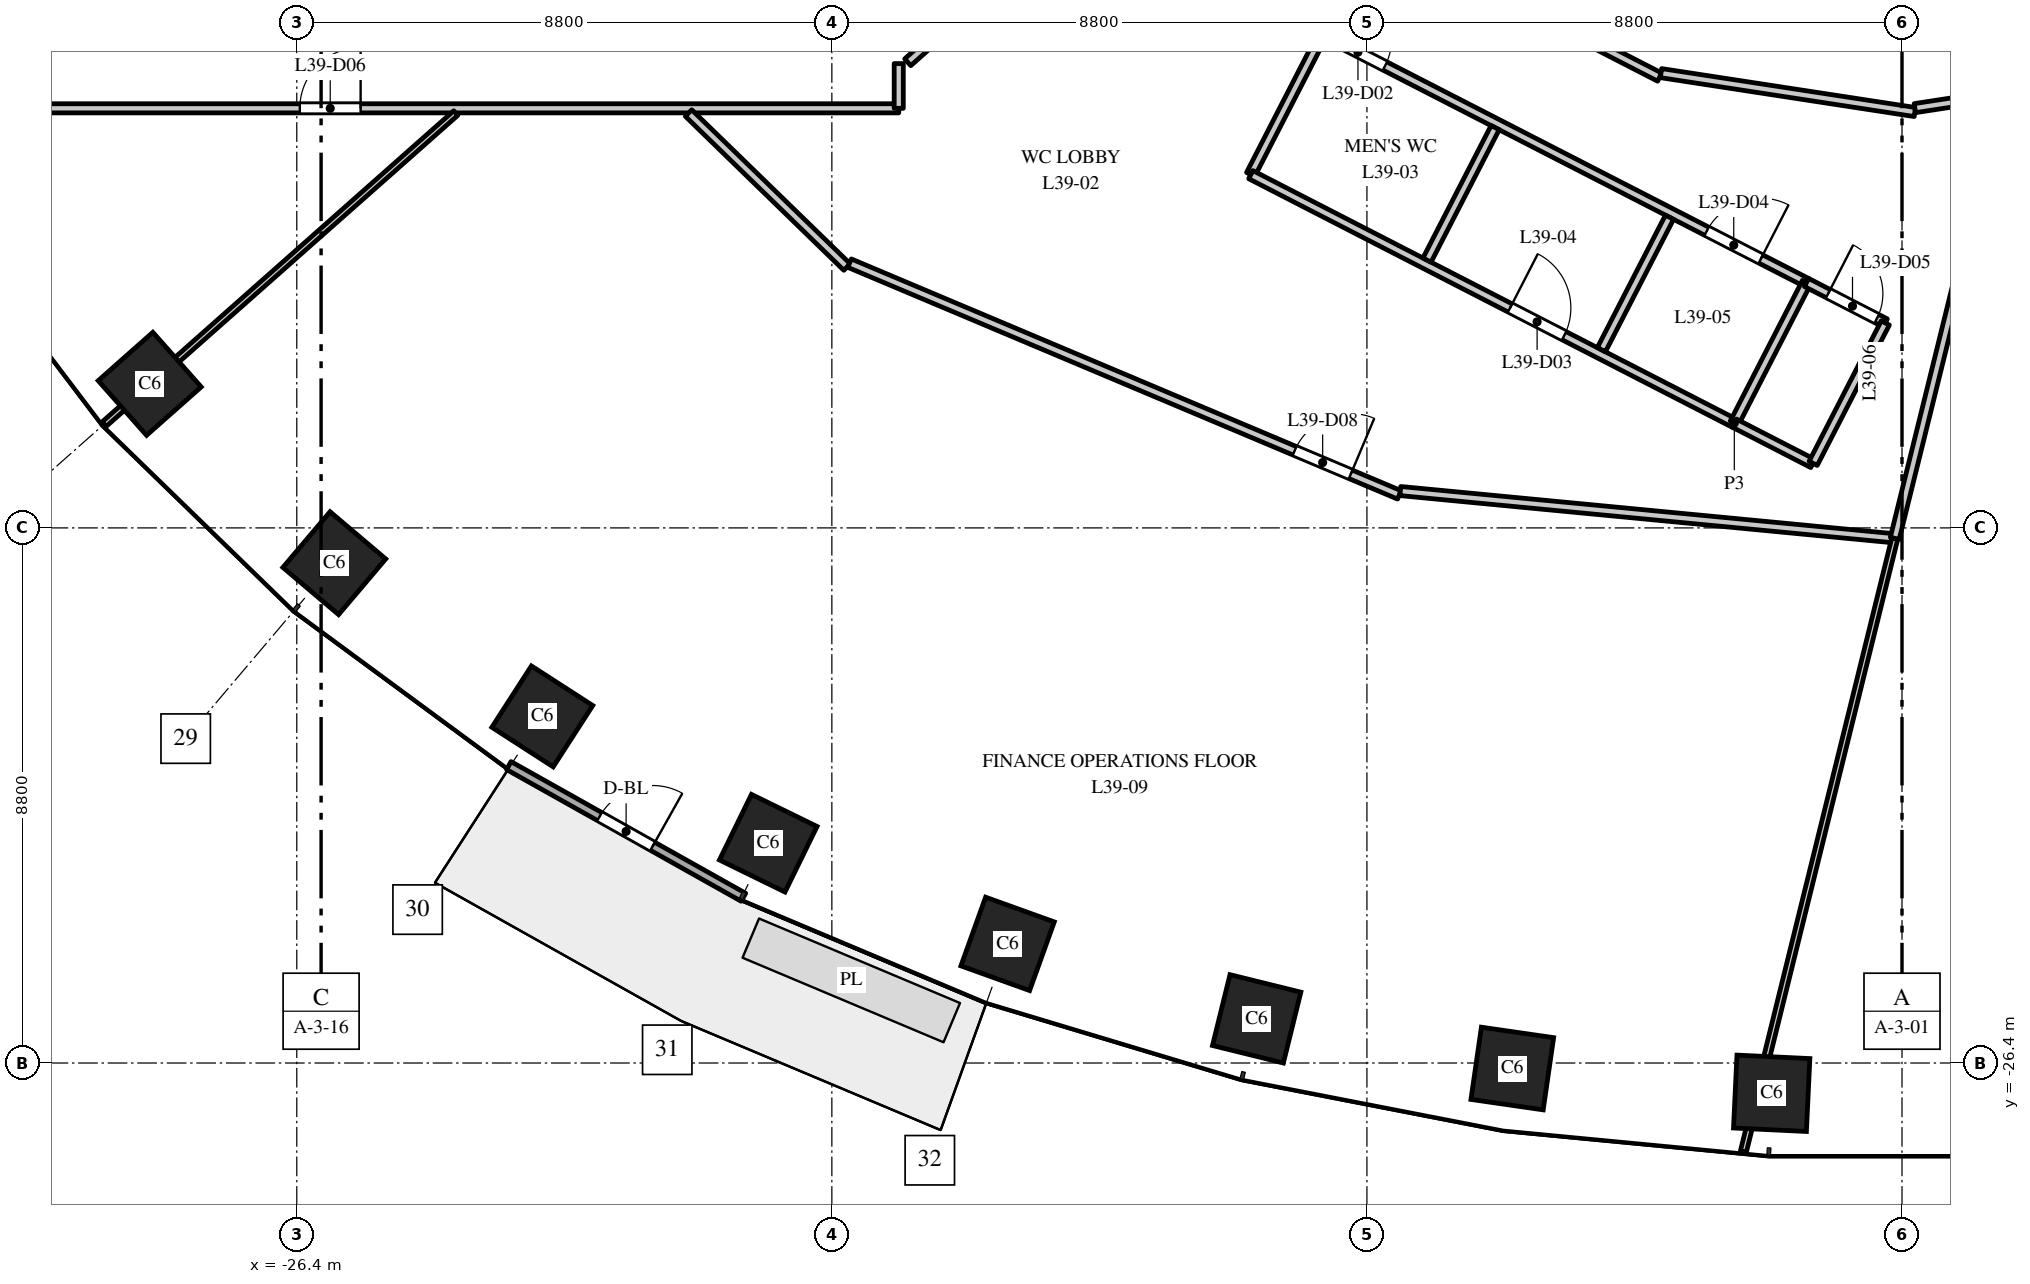
"""IFC4 building model, lengths in metres.
Left out: names, types, materials, properties, quantities, classifications, styles, units other than length and angle.
Written with IfcOpenShell. Run it as: python <this file> out.ifc"""

import sys

from ifc_helpers import new_model, si_unit, direction, frame, frame_2d, origin, origin_2d, place, context, subcontext, project, spatial, rectangle, extrude, element, fill, save


model = new_model("IFC4")
c1 = context("Model", 3, precision=1e-05, world=origin(), true_north=direction((0.0, 1.0)))
c2 = subcontext(c1, "Body", "Model", "MODEL_VIEW")
j1 = project(units=[si_unit("LENGTHUNIT", "METRE"), si_unit("PLANEANGLEUNIT", "RADIAN")], contexts=[c1])
p1 = place(None, origin())
s1 = spatial("IfcSite", under=j1, at=p1, CompositionType="ELEMENT")
p2 = place(p1, origin())
s2 = spatial("IfcBuilding", under=s1, at=p2, CompositionType="ELEMENT")
p3 = place(p2, frame((0.0, 0.0, 170.0)))
s3 = spatial("IfcBuildingStorey", under=s2, at=p3, CompositionType="ELEMENT", Elevation=170.0)
for number, where, z_axis, x_axis in (
    (1, (-28.819, -15.23, 0.0), (0.0, 0.0, 1.0), (0.663, -0.749, 0.0)),
    (2, (-25.783, -18.18, 0.0), (0.0, 0.0, 1.0), (0.763, -0.646, 0.0)),
    (3, (-22.362, -20.7, 0.0), (0.0, 0.0, 1.0), (0.84, -0.542, 0.0)),
    (4, (-18.646, -22.785, 0.0), (0.0, 0.0, 1.0), (0.898, -0.439, 0.0)),
    (5, (-14.709, -24.441, 0.0), (0.0, 0.0, 1.0), (0.941, -0.338, 0.0)),
    (6, (-10.613, -25.674, 0.0), (0.0, 0.0, 1.0), (0.971, -0.24, 0.0)),
    (7, (-6.409, -26.491, 0.0), (0.0, 0.0, 1.0), (0.99, -0.143, 0.0)),
    (8, (-2.143, -26.898, 0.0), (0.0, 0.0, 1.0), (0.999, -0.048, 0.0)),
):
    element("IfcColumn", number, at=place(p3, frame(where, z_axis=z_axis, x_axis=x_axis)), inside=s3, PredefinedType="COLUMN", context=c2, shape_type="SweptSolid", body=[
        extrude(rectangle(XDim=1.2, YDim=1.2, at=origin_2d()), origin(), (0.0, 0.0, 1.0), 4.0),
    ])
p4 = place(p3, frame((-22.913, -21.509, 0.0), z_axis=(0.0, 0.0, 1.0), x_axis=(0.872046572975, -0.489422899509, 0.0)))
e9 = element("IfcWall", 9, at=p4, inside=s3, PredefinedType="STANDARD", context=c2, shape_type="SweptSolid", body=[
    extrude(rectangle(XDim=4.426, YDim=0.15, at=frame_2d((2.213, 0.0))), origin(), (0.0, 0.0, 1.0), 3.7),
])
p5 = place(p4, frame((1.713, 0.0, 0.0)))
e10 = element("IfcOpeningElement", 10, at=p5, cuts=e9, PredefinedType="OPENING", context=c2, shape_type="SweptSolid", body=[
    extrude(rectangle(XDim=1.0, YDim=2.4, at=frame_2d((0.5, 1.2))), frame((0.0, 0.085, 0.0), z_axis=(0.0, -1.0, 0.0), x_axis=(1.0, 0.0, 0.0)), (0.0, 0.0, 1.0), 0.17),
])
p6 = place(p3, frame((-31.5, -10.7, 0.0), z_axis=(0.0, 0.0, 1.0), x_axis=(1.0, 0.0, 0.0)))
e11 = element("IfcWall", 11, at=p6, inside=s3, PredefinedType="PARTITIONING", context=c2, shape_type="SweptSolid", body=[
    extrude(rectangle(XDim=15.0, YDim=0.15, at=frame_2d((7.5, 0.0))), origin(), (0.0, 0.0, 1.0), 3.1),
])
p7 = place(p6, frame((5.15, 0.0, 0.0)))
e12 = element("IfcOpeningElement", 12, at=p7, cuts=e11, PredefinedType="OPENING", context=c2, shape_type="SweptSolid", body=[
    extrude(rectangle(XDim=1.0, YDim=2.1, at=frame_2d((0.5, 1.05))), frame((0.0, 0.085, 0.0), z_axis=(0.0, -1.0, 0.0), x_axis=(1.0, 0.0, 0.0)), (0.0, 0.0, 1.0), 0.17),
])
p8 = place(p3, frame((-29.569, -15.895, 0.0), z_axis=(0.0, 0.0, 1.0), x_axis=(0.748985701008, 0.662586160198, 0.0)))
e13 = element("IfcWall", 13, at=p8, inside=s3, PredefinedType="PARTITIONING", context=c2, shape_type="SweptSolid", body=[
    extrude(rectangle(XDim=7.723, YDim=0.1, at=frame_2d((3.861, 0.0))), origin(), (0.0, 0.0, 1.0), 2.9),
])
p9 = place(p3, frame((-19.957, -10.778, 0.0), z_axis=(0.0, 0.0, 1.0), x_axis=(0.717213172792, -0.696853833148, 0.0)))
e14 = element("IfcWall", 14, at=p9, inside=s3, PredefinedType="PARTITIONING", context=c2, shape_type="SweptSolid", body=[
    extrude(rectangle(XDim=3.634, YDim=0.15, at=frame_2d((1.817, 0.0))), origin(), (0.0, 0.0, 1.0), 2.75),
])
p10 = place(p3, frame((-17.309, -13.246, 0.0), z_axis=(0.0, 0.0, 1.0), x_axis=(0.92150277738, -0.388371769417, 0.0)))
e15 = element("IfcWall", 15, at=p10, inside=s3, PredefinedType="PARTITIONING", context=c2, shape_type="SweptSolid", body=[
    extrude(rectangle(XDim=9.812, YDim=0.15, at=frame_2d((4.906, 0.0))), origin(), (0.0, 0.0, 1.0), 2.85),
])
p11 = place(p10, frame((7.944, 0.0, 0.0)))
e16 = element("IfcOpeningElement", 16, at=p11, cuts=e15, PredefinedType="OPENING", context=c2, shape_type="SweptSolid", body=[
    extrude(rectangle(XDim=1.0, YDim=2.1, at=frame_2d((0.5, 1.05))), frame((0.0, 0.085, 0.0), z_axis=(0.0, -1.0, 0.0), x_axis=(1.0, 0.0, 0.0)), (0.0, 0.0, 1.0), 0.17),
])
p12 = place(p3, frame((-16.5, -10.7, 0.0), z_axis=(0.0, 0.0, 1.0), x_axis=(0.0, 1.0, 0.0)))
e17 = element("IfcWall", 17, at=p12, inside=s3, PredefinedType="PARTITIONING", context=c2, shape_type="SweptSolid", body=[
    extrude(rectangle(XDim=0.736, YDim=0.15, at=frame_2d((0.368, 0.0))), origin(), (0.0, 0.0, 1.0), 3.7),
])
p13 = place(p3, frame((-10.713, -11.789, 0.0), z_axis=(0.0, 0.0, 1.0), x_axis=(0.457029651421, 0.88945145889, 0.0)))
e18 = element("IfcWall", 18, at=p13, inside=s3, PredefinedType="PARTITIONING", context=c2, shape_type="SweptSolid", body=[
    extrude(rectangle(XDim=2.599, YDim=0.15, at=frame_2d((1.3, 0.0))), origin(), (0.0, 0.0, 1.0), 3.7),
])
p14 = place(p3, frame((-10.71, -11.791, 0.0), z_axis=(0.0, 0.0, 1.0), x_axis=(0.889407716884, -0.457114770214, 0.0)))
e19 = element("IfcWall", 19, at=p14, inside=s3, PredefinedType="PARTITIONING", context=c2, shape_type="SweptSolid", body=[
    extrude(rectangle(XDim=8.941, YDim=0.15, at=frame_2d((4.47, 0.0))), origin(), (0.0, 0.0, 1.0), 2.85),
])
p15 = place(p14, frame((4.794, 0.0, 0.0)))
e20 = element("IfcOpeningElement", 20, at=p15, cuts=e19, PredefinedType="OPENING", context=c2, shape_type="SweptSolid", body=[
    extrude(rectangle(XDim=1.0, YDim=2.1, at=frame_2d((0.5, 1.05))), frame((0.0, 0.085, 0.0), z_axis=(0.0, -1.0, 0.0), x_axis=(1.0, 0.0, 0.0)), (0.0, 0.0, 1.0), 0.17),
])
p16 = place(p3, frame((-9.526, -9.479, 0.0), z_axis=(0.0, 0.0, 1.0), x_axis=(0.889587704396, -0.456764398992, 0.0)))
e21 = element("IfcWall", 21, at=p16, inside=s3, PredefinedType="PARTITIONING", context=c2, shape_type="SweptSolid", body=[
    extrude(rectangle(XDim=8.943, YDim=0.15, at=frame_2d((4.472, 0.0))), origin(), (0.0, 0.0, 1.0), 2.85),
])
p17 = place(p16, frame((0.15, 0.0, 0.0)))
e22 = element("IfcOpeningElement", 22, at=p17, cuts=e21, PredefinedType="OPENING", context=c2, shape_type="SweptSolid", body=[
    extrude(rectangle(XDim=1.0, YDim=2.1, at=frame_2d((0.5, 1.05))), frame((0.0, 0.085, 0.0), z_axis=(0.0, -1.0, 0.0), x_axis=(1.0, 0.0, 0.0)), (0.0, 0.0, 1.0), 0.17),
])
p18 = place(p16, frame((7.098, 0.0, 0.0)))
e23 = element("IfcOpeningElement", 23, at=p18, cuts=e21, PredefinedType="OPENING", context=c2, shape_type="SweptSolid", body=[
    extrude(rectangle(XDim=1.0, YDim=2.1, at=frame_2d((0.5, 1.05))), frame((0.0, 0.085, 0.0), z_axis=(0.0, -1.0, 0.0), x_axis=(1.0, 0.0, 0.0)), (0.0, 0.0, 1.0), 0.17),
])
p19 = place(p3, frame((-8.251, -16.994, 0.0), z_axis=(0.0, 0.0, 1.0), x_axis=(0.995454957633, -0.095233540959, 0.0)))
e24 = element("IfcWall", 24, at=p19, inside=s3, PredefinedType="PARTITIONING", context=c2, shape_type="SweptSolid", body=[
    extrude(rectangle(XDim=8.17, YDim=0.15, at=frame_2d((4.085, 0.0))), origin(), (0.0, 0.0, 1.0), 2.85),
])
p20 = place(p3, frame((-7.859, -8.196, 0.0), z_axis=(0.0, 0.0, 1.0), x_axis=(0.889405670308, -0.457118752213, 0.0)))
e25 = element("IfcWall", 25, at=p20, inside=s3, PredefinedType="PARTITIONING", context=c2, shape_type="SweptSolid", body=[
    extrude(rectangle(XDim=4.355, YDim=0.15, at=frame_2d((2.178, 0.0))), origin(), (0.0, 0.0, 1.0), 2.85),
])
p21 = place(p20, frame((0.448, 0.0, 0.0)))
e26 = element("IfcOpeningElement", 26, at=p21, cuts=e25, PredefinedType="OPENING", context=c2, shape_type="SweptSolid", body=[
    extrude(rectangle(XDim=1.0, YDim=2.1, at=frame_2d((0.5, 1.05))), frame((0.0, 0.085, 0.0), z_axis=(0.0, -1.0, 0.0), x_axis=(1.0, 0.0, 0.0)), (0.0, 0.0, 1.0), 0.17),
])
p22 = place(p3, frame((-7.812, -13.196, 0.0), z_axis=(0.0, 0.0, 1.0), x_axis=(0.457505588377, 0.889206745703, 0.0)))
e27 = element("IfcWall", 27, at=p22, inside=s3, PredefinedType="PARTITIONING", context=c2, shape_type="SweptSolid", body=[
    extrude(rectangle(XDim=2.45, YDim=0.15, at=frame_2d((1.225, 0.0))), origin(), (0.0, 0.0, 1.0), 3.7),
])
p23 = place(p3, frame((-4.944, -14.669, 0.0), z_axis=(0.0, 0.0, 1.0), x_axis=(0.457352517402, 0.889285485559, 0.0)))
e28 = element("IfcWall", 28, at=p23, inside=s3, PredefinedType="PARTITIONING", context=c2, shape_type="SweptSolid", body=[
    extrude(rectangle(XDim=2.449, YDim=0.15, at=frame_2d((1.225, 0.0))), origin(), (0.0, 0.0, 1.0), 3.7),
])
p24 = place(p3, frame((-3.964, -10.121, 0.0), z_axis=(0.0, 0.0, 1.0), x_axis=(0.988463044045, -0.151462241359, 0.0)))
e29 = element("IfcWall", 29, at=p24, inside=s3, PredefinedType="PARTITIONING", context=c2, shape_type="SweptSolid", body=[
    extrude(rectangle(XDim=4.225, YDim=0.15, at=frame_2d((2.112, 0.0))), origin(), (0.0, 0.0, 1.0), 2.85),
])
p25 = place(p3, frame((-2.758, -15.877, 0.0), z_axis=(0.0, 0.0, 1.0), x_axis=(0.45687697466, 0.88952989271, 0.0)))
e30 = element("IfcWall", 30, at=p25, inside=s3, PredefinedType="PARTITIONING", context=c2, shape_type="SweptSolid", body=[
    extrude(rectangle(XDim=2.6, YDim=0.15, at=frame_2d((1.3, 0.0))), origin(), (0.0, 0.0, 1.0), 3.7),
])
p26 = place(p3, frame((-2.758, -15.877, 0.0), z_axis=(0.0, 0.0, 1.0), x_axis=(0.889397143567, -0.45713534212, 0.0)))
e31 = element("IfcWall", 31, at=p26, inside=s3, PredefinedType="PARTITIONING", context=c2, shape_type="SweptSolid", body=[
    extrude(rectangle(XDim=1.453, YDim=0.15, at=frame_2d((0.726, 0.0))), origin(), (0.0, 0.0, 1.0), 3.7),
])
p27 = place(p3, frame((-2.609, -27.858, 0.0), z_axis=(0.0, 0.0, 1.0), x_axis=(0.23976994075, 0.970829735594, 0.0)))
e32 = element("IfcWall", 32, at=p27, inside=s3, PredefinedType="PARTITIONING", context=c2, shape_type="SweptSolid", body=[
    extrude(rectangle(XDim=10.389, YDim=0.1, at=frame_2d((5.194, 0.0))), origin(), (0.0, 0.0, 1.0), 2.85),
])
p28 = place(p3, frame((-1.57, -13.564, 0.0), z_axis=(0.0, 0.0, 1.0), x_axis=(0.889307281448, -0.457310134551, 0.0)))
e33 = element("IfcWall", 33, at=p28, inside=s3, PredefinedType="PARTITIONING", context=c2, shape_type="SweptSolid", body=[
    extrude(rectangle(XDim=1.456, YDim=0.15, at=frame_2d((0.728, 0.0))), origin(), (0.0, 0.0, 1.0), 2.85),
])
p29 = place(p28, frame((0.4, 0.0, 0.0)))
e34 = element("IfcOpeningElement", 34, at=p29, cuts=e33, PredefinedType="OPENING", context=c2, shape_type="SweptSolid", body=[
    extrude(rectangle(XDim=0.9, YDim=2.1, at=frame_2d((0.45, 1.05))), frame((0.0, 0.085, 0.0), z_axis=(0.0, -1.0, 0.0), x_axis=(1.0, 0.0, 0.0)), (0.0, 0.0, 1.0), 0.17),
])
p30 = place(p3, frame((-1.461, -16.539, 0.0), z_axis=(0.0, 0.0, 1.0), x_axis=(0.456893187255, 0.889521565472, 0.0)))
e35 = element("IfcWall", 35, at=p30, inside=s3, PredefinedType="PARTITIONING", context=c2, shape_type="SweptSolid", body=[
    extrude(rectangle(XDim=2.596, YDim=0.15, at=frame_2d((1.298, 0.0))), origin(), (0.0, 0.0, 1.0), 2.85),
])
p31 = place(p3, frame((-0.119, -17.772, 0.0), z_axis=(0.0, 0.0, 1.0), x_axis=(0.239932477291, 0.970789578818, 0.0)))
e36 = element("IfcWall", 36, at=p31, inside=s3, PredefinedType="PARTITIONING", context=c2, shape_type="SweptSolid", body=[
    extrude(rectangle(XDim=7.439, YDim=0.15, at=frame_2d((3.72, 0.0))), origin(), (0.0, 0.0, 1.0), 3.7),
])
p32 = place(p3, frame((0.212, -10.697, 0.0), z_axis=(0.0, 0.0, 1.0), x_axis=(0.988454390794, 0.151518702874, 0.0)))
e37 = element("IfcWall", 37, at=p32, inside=s3, PredefinedType="PARTITIONING", context=c2, shape_type="SweptSolid", body=[
    extrude(rectangle(XDim=4.225, YDim=0.15, at=frame_2d((2.112, 0.0))), origin(), (0.0, 0.0, 1.0), 2.85),
])
p33 = place(p3, frame((-15.087, -8.819, 0.0), z_axis=(0.0, 0.0, 1.0), x_axis=(-0.747926695066, -0.663781333579, 0.0)))
e38 = element("IfcWall", 38, at=p33, inside=s3, PredefinedType="PARTITIONING", context=c2, shape_type="SweptSolid", body=[
    extrude(rectangle(XDim=1.691, YDim=0.15, at=frame_2d((0.846, 0.0))), origin(), (0.0, 0.0, 1.0), 3.7),
])
p34 = place(p5, origin())
e39 = element("IfcDoor", 39, at=p34, inside=s3, OperationType="SINGLE_SWING_RIGHT", PredefinedType="DOOR", context=c2, shape_type="SweptSolid", body=[
    extrude(rectangle(XDim=1.0, YDim=2.4, at=frame_2d((0.5, 1.2))), frame((0.0, 0.025, 0.0), z_axis=(0.0, -1.0, 0.0), x_axis=(1.0, 0.0, 0.0)), (0.0, 0.0, 1.0), 0.05),
])
fill(e10, e39)
p35 = place(p17, origin())
e40 = element("IfcDoor", 40, at=p35, inside=s3, OperationType="SINGLE_SWING_LEFT", PredefinedType="DOOR", context=c2, shape_type="SweptSolid", body=[
    extrude(rectangle(XDim=1.0, YDim=2.1, at=frame_2d((0.5, 1.05))), frame((0.0, 0.025, 0.0), z_axis=(0.0, -1.0, 0.0), x_axis=(1.0, 0.0, 0.0)), (0.0, 0.0, 1.0), 0.05),
])
fill(e22, e40)
p36 = place(p15, origin())
e41 = element("IfcDoor", 41, at=p36, inside=s3, OperationType="SINGLE_SWING_LEFT", PredefinedType="DOOR", context=c2, shape_type="SweptSolid", body=[
    extrude(rectangle(XDim=1.0, YDim=2.1, at=frame_2d((0.5, 1.05))), frame((0.0, 0.025, 0.0), z_axis=(0.0, -1.0, 0.0), x_axis=(1.0, 0.0, 0.0)), (0.0, 0.0, 1.0), 0.05),
])
fill(e20, e41)
p37 = place(p18, origin())
e42 = element("IfcDoor", 42, at=p37, inside=s3, OperationType="SINGLE_SWING_RIGHT", PredefinedType="DOOR", context=c2, shape_type="SweptSolid", body=[
    extrude(rectangle(XDim=1.0, YDim=2.1, at=frame_2d((0.5, 1.05))), frame((0.0, 0.025, 0.0), z_axis=(0.0, -1.0, 0.0), x_axis=(1.0, 0.0, 0.0)), (0.0, 0.0, 1.0), 0.05),
])
fill(e23, e42)
p38 = place(p29, origin())
e43 = element("IfcDoor", 43, at=p38, inside=s3, OperationType="SINGLE_SWING_LEFT", PredefinedType="DOOR", context=c2, shape_type="SweptSolid", body=[
    extrude(rectangle(XDim=0.9, YDim=2.1, at=frame_2d((0.45, 1.05))), frame((0.0, 0.025, 0.0), z_axis=(0.0, -1.0, 0.0), x_axis=(1.0, 0.0, 0.0)), (0.0, 0.0, 1.0), 0.05),
])
fill(e34, e43)
p39 = place(p7, origin())
e44 = element("IfcDoor", 44, at=p39, inside=s3, OperationType="SINGLE_SWING_RIGHT", PredefinedType="DOOR", context=c2, shape_type="SweptSolid", body=[
    extrude(rectangle(XDim=1.0, YDim=2.1, at=frame_2d((0.5, 1.05))), frame((0.0, 0.025, 0.0), z_axis=(0.0, -1.0, 0.0), x_axis=(1.0, 0.0, 0.0)), (0.0, 0.0, 1.0), 0.05),
])
fill(e12, e44)
p40 = place(p11, origin())
e45 = element("IfcDoor", 45, at=p40, inside=s3, OperationType="SINGLE_SWING_RIGHT", PredefinedType="DOOR", context=c2, shape_type="SweptSolid", body=[
    extrude(rectangle(XDim=1.0, YDim=2.1, at=frame_2d((0.5, 1.05))), frame((0.0, 0.025, 0.0), z_axis=(0.0, -1.0, 0.0), x_axis=(1.0, 0.0, 0.0)), (0.0, 0.0, 1.0), 0.05),
])
fill(e16, e45)
save(model, sys.argv[1])
